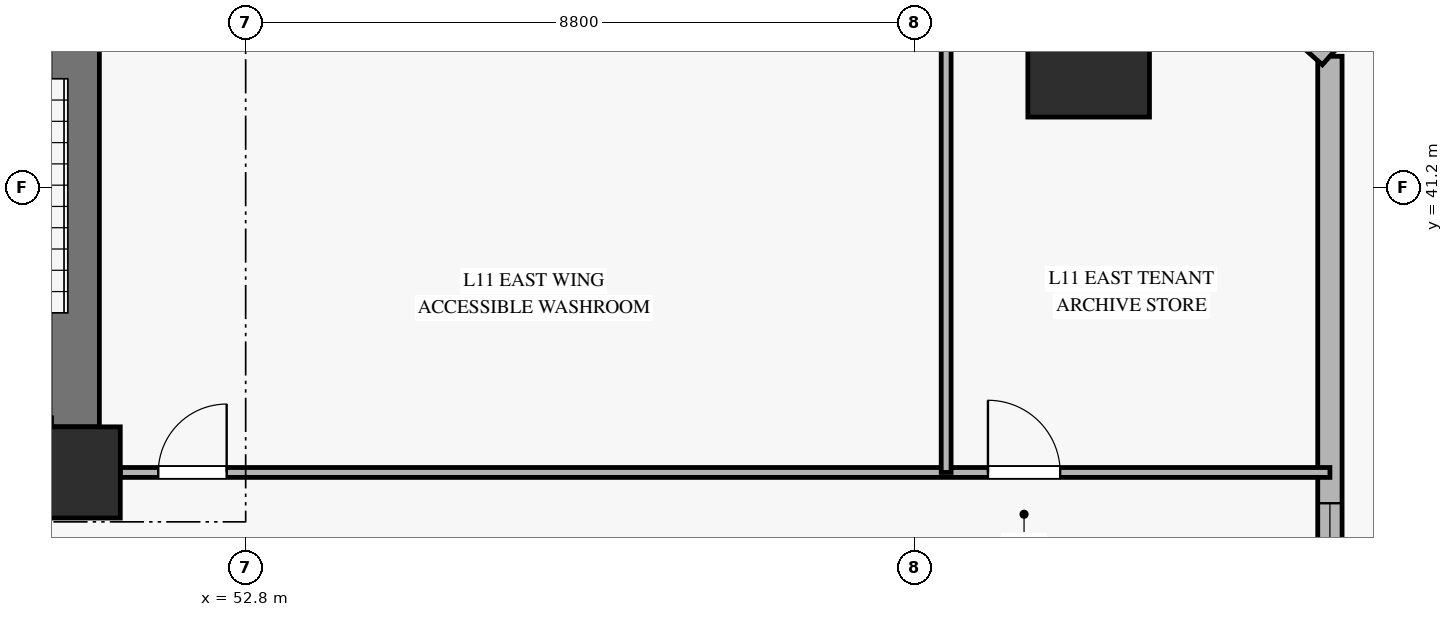
"""IFC4 building model, lengths in metres.
Left out: names, types, materials, properties, quantities, classifications, styles, units other than length and angle.
Written with IfcOpenShell. Run it as: python <this file> out.ifc"""

import sys

from ifc_helpers import new_model, si_unit, direction, frame, frame_2d, origin, origin_2d, place, context, subcontext, project, spatial, rectangle, hollow_rectangle, extrude, source, transform, mapped, element, fill, save


model = new_model("IFC4")
c1 = context("Model", 3, precision=1e-05, world=origin(), true_north=direction((0.0, 1.0)))
c2 = subcontext(c1, "Body", "Model", "MODEL_VIEW")
j1 = project(units=[si_unit("LENGTHUNIT", "METRE"), si_unit("PLANEANGLEUNIT", "RADIAN")], contexts=[c1])
p1 = place(None, origin())
s1 = spatial("IfcSite", under=j1, at=p1, CompositionType="ELEMENT")
p2 = place(p1, origin())
s2 = spatial("IfcBuilding", under=s1, at=p2, CompositionType="ELEMENT")
p3 = place(p2, frame((0.0, 0.0, 44.9)))
s3 = spatial("IfcBuildingStorey", under=s2, at=p3, CompositionType="ELEMENT", Elevation=44.9)
m1 = source(origin(), c2, "Body", "SweptSolid", [
    extrude(rectangle(XDim=1.2, YDim=1.2, at=origin_2d()), origin(), (0.0, 0.0, 1.0), 3.62),
])
p4 = place(p3, frame((50.55, 37.45, 0.0), z_axis=(0.0, 0.0, 1.0), x_axis=(1.0, 0.0, 0.0)))
e1 = element("IfcColumn", 1, at=p4, inside=s3, PredefinedType="PILASTER", context=c2, shape_type="MappedRepresentation", body=[
    mapped(m1, transform((0.0, 0.0, 0.0), x_axis=(1.0, 0.0, 0.0), y_axis=(0.0, 1.0, 0.0), z_axis=(0.0, 0.0, 1.0), scale=1.0)),
])
p5 = place(p3, frame((50.55, 38.05, 0.0), z_axis=(0.0, 0.0, 1.0), x_axis=(0.0, 1.0, 0.0)))
e2 = element("IfcWall", 2, at=p5, inside=s3, PredefinedType="SHEAR", context=c2, shape_type="SweptSolid", body=[
    extrude(rectangle(XDim=7.9, YDim=0.65, at=frame_2d((3.95, 0.0))), origin(), (0.0, 0.0, 1.0), 3.62),
])
m2 = source(origin(), c2, "Body", "SweptSolid", [
    extrude(hollow_rectangle(XDim=1.6, YDim=1.6, WallThickness=0.075, at=origin_2d()), origin(), (0.0, 0.0, 1.0), 3.626),
])
p6 = place(p3, frame((63.891, 42.926, 0.0), z_axis=(-0.057698302779, 0.007136546201, 0.998308557293), x_axis=(-0.122751882683, -0.992437391122, 0.0)))
e3 = element("IfcColumn", 3, at=p6, inside=s3, PredefinedType="COLUMN", context=c2, shape_type="MappedRepresentation", body=[
    mapped(m2, transform((0.0, 0.0, 0.0), x_axis=(1.0, 0.0, 0.0), y_axis=(0.0, 1.0, 0.0), z_axis=(0.0, 0.0, 1.0), scale=1.0)),
])
p7 = place(p3, frame((67.065, 25.513, 0.0), z_axis=(0.0, 0.0, 1.0), x_axis=(0.0, 1.0, 0.0)))
e4 = element("IfcWall", 4, at=p7, inside=s3, PredefinedType="SOLIDWALL", context=c2, shape_type="SweptSolid", body=[
    extrude(rectangle(XDim=17.413, YDim=0.32, at=frame_2d((8.707, 0.0))), origin(), (0.0, 0.0, 1.0), 3.1),
])
p8 = place(p7, frame((9.132, 0.0, 0.45)))
e5 = element("IfcOpeningElement", 5, at=p8, cuts=e4, PredefinedType="OPENING", context=c2, shape_type="SweptSolid", body=[
    extrude(rectangle(XDim=2.4, YDim=2.1, at=frame_2d((1.2, 1.05))), frame((0.0, 0.17, 0.0), z_axis=(0.0, -1.0, 0.0), x_axis=(1.0, 0.0, 0.0)), (0.0, 0.0, 1.0), 0.34),
])
p9 = place(p3, frame((67.065, 42.926, 0.0), z_axis=(0.0, 0.0, 1.0), x_axis=(-0.746028775675, 0.665913707521, 0.0)))
e6 = element("IfcWall", 6, at=p9, inside=s3, PredefinedType="SOLIDWALL", context=c2, shape_type="SweptSolid", body=[
    extrude(rectangle(XDim=4.992, YDim=0.3, at=frame_2d((2.496, 0.0))), origin(), (0.0, 0.0, 1.0), 3.1),
])
p10 = place(p9, frame((1.696, 0.0, 0.45)))
e7 = element("IfcOpeningElement", 7, at=p10, cuts=e6, PredefinedType="OPENING", context=c2, shape_type="SweptSolid", body=[
    extrude(rectangle(XDim=1.6, YDim=2.0, at=frame_2d((0.8, 1.0))), frame((0.0, 0.16, 0.0), z_axis=(0.0, -1.0, 0.0), x_axis=(1.0, 0.0, 0.0)), (0.0, 0.0, 1.0), 0.32),
])
p11 = place(p3, frame((51.15, 37.45, 0.0), z_axis=(0.0, 0.0, 1.0), x_axis=(1.0, 0.0, 0.0)))
e8 = element("IfcWall", 8, at=p11, inside=s3, PredefinedType="PARTITIONING", context=c2, shape_type="SweptSolid", body=[
    extrude(rectangle(XDim=15.915, YDim=0.13, at=frame_2d((7.958, 0.0))), origin(), (0.0, 0.0, 1.0), 3.105),
])
p12 = place(p11, frame((0.5, 0.0, 0.0)))
e9 = element("IfcOpeningElement", 9, at=p12, cuts=e8, PredefinedType="OPENING", context=c2, shape_type="SweptSolid", body=[
    extrude(rectangle(XDim=0.9, YDim=2.1, at=frame_2d((0.45, 1.05))), frame((0.0, 0.075, 0.0), z_axis=(0.0, -1.0, 0.0), x_axis=(1.0, 0.0, 0.0)), (0.0, 0.0, 1.0), 0.15),
])
p13 = place(p11, frame((11.416, 0.0, 0.0)))
e10 = element("IfcOpeningElement", 10, at=p13, cuts=e8, PredefinedType="OPENING", context=c2, shape_type="SweptSolid", body=[
    extrude(rectangle(XDim=0.95, YDim=2.1, at=frame_2d((0.475, 1.05))), frame((0.0, 0.075, 0.0), z_axis=(0.0, -1.0, 0.0), x_axis=(1.0, 0.0, 0.0)), (0.0, 0.0, 1.0), 0.15),
])
p14 = place(p3, frame((62.016, 37.45, 0.0), z_axis=(0.0, 0.0, 1.0), x_axis=(0.0, 1.0, 0.0)))
e11 = element("IfcWall", 11, at=p14, inside=s3, PredefinedType="PARTITIONING", context=c2, shape_type="SweptSolid", body=[
    extrude(rectangle(XDim=8.8, YDim=0.13, at=frame_2d((4.4, 0.0))), origin(), (0.0, 0.0, 1.0), 3.62),
])
m3 = source(origin(), c2, "Body", "SweptSolid", [
    extrude(rectangle(XDim=2.4, YDim=2.1, at=frame_2d((1.2, 1.05))), frame((0.0, 0.03, 0.0), z_axis=(0.0, -1.0, 0.0), x_axis=(1.0, 0.0, 0.0)), (0.0, 0.0, 1.0), 0.06),
])
p15 = place(p8, origin())
e12 = element("IfcWindow", 12, at=p15, inside=s3, PartitioningType="SINGLE_PANEL", PredefinedType="WINDOW", context=c2, shape_type="MappedRepresentation", body=[
    mapped(m3, transform((0.0, 0.0, 0.0), x_axis=(1.0, 0.0, 0.0), y_axis=(0.0, 1.0, 0.0), z_axis=(0.0, 0.0, 1.0), scale=1.0)),
])
fill(e5, e12)
m4 = source(origin(), c2, "Body", "SweptSolid", [
    extrude(rectangle(XDim=0.9, YDim=2.1, at=frame_2d((0.45, 1.05))), frame((0.0, 0.025, 0.0), z_axis=(0.0, -1.0, 0.0), x_axis=(1.0, 0.0, 0.0)), (0.0, 0.0, 1.0), 0.05),
])
p16 = place(p12, origin())
e13 = element("IfcDoor", 13, at=p16, inside=s3, OperationType="SINGLE_SWING_RIGHT", PredefinedType="DOOR", context=c2, shape_type="MappedRepresentation", body=[
    mapped(m4, transform((0.0, 0.0, 0.0), x_axis=(1.0, 0.0, 0.0), y_axis=(0.0, 1.0, 0.0), z_axis=(0.0, 0.0, 1.0), scale=1.0)),
])
fill(e9, e13)
m5 = source(origin(), c2, "Body", "SweptSolid", [
    extrude(rectangle(XDim=0.95, YDim=2.1, at=frame_2d((0.475, 1.05))), frame((0.0, 0.025, 0.0), z_axis=(0.0, -1.0, 0.0), x_axis=(1.0, 0.0, 0.0)), (0.0, 0.0, 1.0), 0.05),
])
p17 = place(p13, origin())
e14 = element("IfcDoor", 14, at=p17, inside=s3, OperationType="SINGLE_SWING_LEFT", PredefinedType="DOOR", context=c2, shape_type="MappedRepresentation", body=[
    mapped(m5, transform((0.0, 0.0, 0.0), x_axis=(1.0, 0.0, 0.0), y_axis=(0.0, 1.0, 0.0), z_axis=(0.0, 0.0, 1.0), scale=1.0)),
])
fill(e10, e14)
save(model, sys.argv[1])
